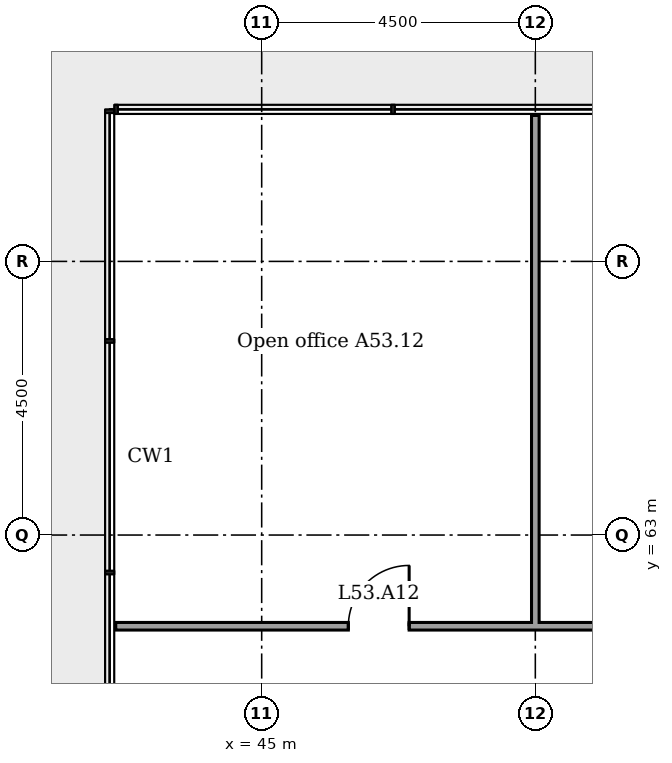
"""IFC4 building model, lengths in metres.
Left out: names, types, materials, properties, quantities, classifications, styles, units other than length and angle.
Written with IfcOpenShell. Run it as: python <this file> out.ifc"""

import sys

from ifc_helpers import new_model, si_unit, direction, frame, frame_2d, origin, place, context, subcontext, project, spatial, rectangle, extrude, element, fill, save


model = new_model("IFC4")
c1 = context("Model", 3, precision=1e-05, world=origin(), true_north=direction((0.0, 1.0)))
c2 = subcontext(c1, "Body", "Model", "MODEL_VIEW")
j1 = project(units=[si_unit("LENGTHUNIT", "METRE"), si_unit("PLANEANGLEUNIT", "RADIAN")], contexts=[c1])
p1 = place(None, origin())
s1 = spatial("IfcSite", under=j1, at=p1, CompositionType="ELEMENT")
p2 = place(p1, origin())
s2 = spatial("IfcBuilding", under=s1, at=p2, CompositionType="ELEMENT")
p3 = place(p2, frame((0.0, 0.0, 210.0)))
s3 = spatial("IfcBuildingStorey", under=s2, at=p3, CompositionType="ELEMENT", Elevation=210.0)
p4 = place(p3, frame((42.6, 61.5, 0.0)))
e1 = element("IfcWall", 1, at=p4, inside=s3, PredefinedType="PARTITIONING", context=c2, shape_type="SweptSolid", body=[
    extrude(rectangle(XDim=17.762, YDim=0.125, at=frame_2d((8.881, 0.0))), origin(), (0.0, 0.0, 1.0), 3.45),
])
p5 = place(p4, frame((13.15, 0.0, 0.0)))
e2 = element("IfcOpeningElement", 2, at=p5, cuts=e1, PredefinedType="OPENING", context=c2, shape_type="SweptSolid", body=[
    extrude(rectangle(XDim=1.0, YDim=2.1, at=frame_2d((0.5, 1.05))), frame((0.0, 0.073, 0.0), z_axis=(0.0, -1.0, 0.0), x_axis=(1.0, 0.0, 0.0)), (0.0, 0.0, 1.0), 0.145),
])
p6 = place(p4, frame((8.195, 0.0, 0.0)))
e3 = element("IfcOpeningElement", 3, at=p6, cuts=e1, PredefinedType="OPENING", context=c2, shape_type="SweptSolid", body=[
    extrude(rectangle(XDim=1.0, YDim=2.1, at=frame_2d((0.5, 1.05))), frame((0.0, 0.073, 0.0), z_axis=(0.0, -1.0, 0.0), x_axis=(1.0, 0.0, 0.0)), (0.0, 0.0, 1.0), 0.145),
])
p7 = place(p4, frame((3.825, 0.0, 0.0)))
e4 = element("IfcOpeningElement", 4, at=p7, cuts=e1, PredefinedType="OPENING", context=c2, shape_type="SweptSolid", body=[
    extrude(rectangle(XDim=1.0, YDim=2.1, at=frame_2d((0.5, 1.05))), frame((0.0, 0.073, 0.0), z_axis=(0.0, -1.0, 0.0), x_axis=(1.0, 0.0, 0.0)), (0.0, 0.0, 1.0), 0.145),
])
p8 = place(p3, frame((49.5, 61.5, 0.0), z_axis=(0.0, 0.0, 1.0), x_axis=(0.0, 1.0, 0.0)))
e5 = element("IfcWall", 5, at=p8, inside=s3, PredefinedType="PARTITIONING", context=c2, shape_type="SweptSolid", body=[
    extrude(rectangle(XDim=8.4, YDim=0.125, at=frame_2d((4.2, 0.0))), origin(), (0.0, 0.0, 1.0), 2.772),
])
p9 = place(p7, origin())
e6 = element("IfcDoor", 6, at=p9, inside=s3, OperationType="SINGLE_SWING_LEFT", PredefinedType="DOOR", context=c2, shape_type="SweptSolid", body=[
    extrude(rectangle(XDim=1.0, YDim=2.1, at=frame_2d((0.5, 1.05))), frame((0.0, 0.025, 0.0), z_axis=(0.0, -1.0, 0.0), x_axis=(1.0, 0.0, 0.0)), (0.0, 0.0, 1.0), 0.05),
])
fill(e4, e6)
save(model, sys.argv[1])
